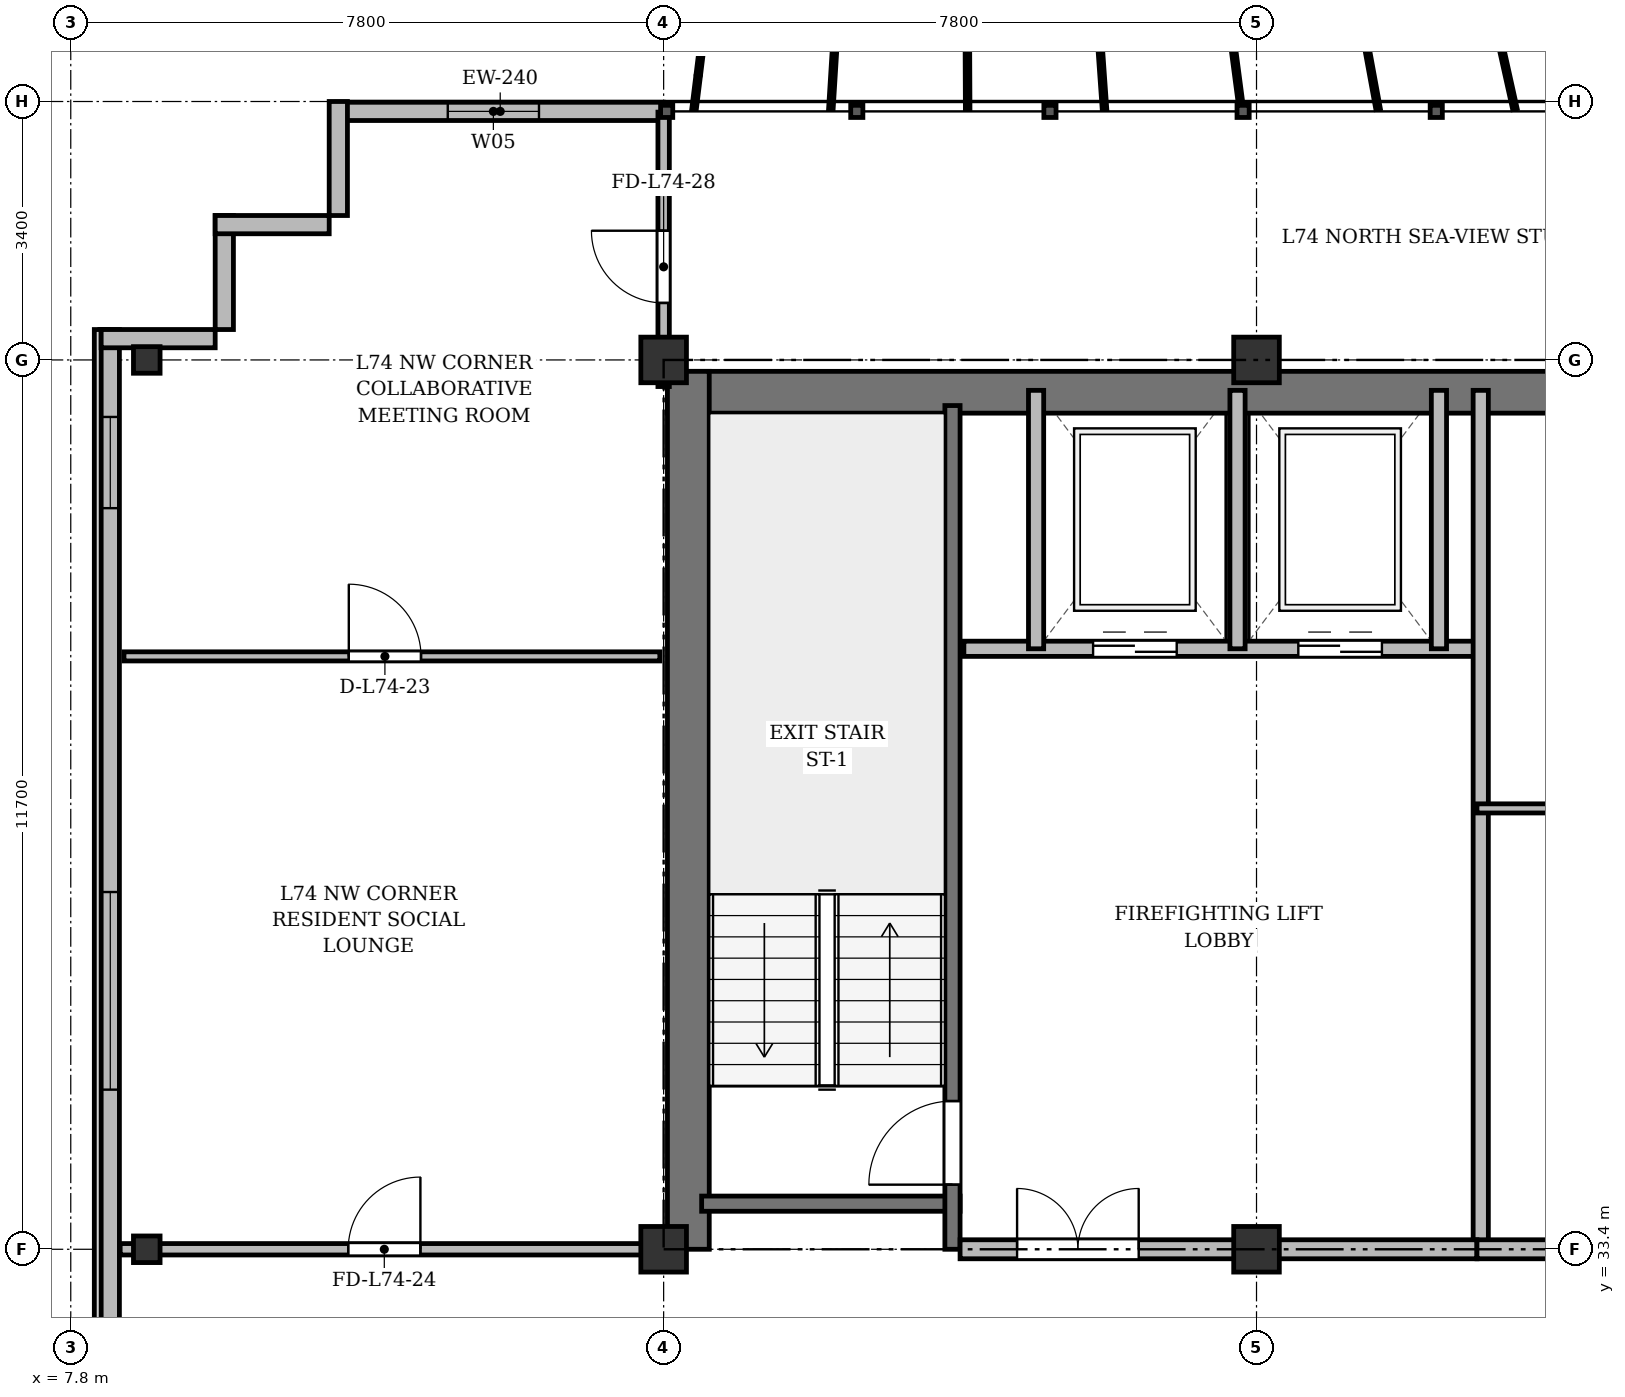
"""IFC4 building model, lengths in metres.
Left out: names, types, materials, properties, quantities, classifications, styles, units other than length and angle.
Written with IfcOpenShell. Run it as: python <this file> out.ifc"""

import sys

from ifc_helpers import new_model, si_unit, direction, frame, frame_2d, origin, origin_2d, place, context, subcontext, project, spatial, rectangle, i_section, extrude, source, transform, mapped, element, fill, save


model = new_model("IFC4")
c1 = context("Model", 3, precision=1e-05, world=origin(), true_north=direction((0.0, 1.0)))
c2 = subcontext(c1, "Body", "Model", "MODEL_VIEW")
j1 = project(units=[si_unit("LENGTHUNIT", "METRE"), si_unit("PLANEANGLEUNIT", "RADIAN")], contexts=[c1])
p1 = place(None, origin())
s1 = spatial("IfcSite", under=j1, at=p1, CompositionType="ELEMENT")
p2 = place(p1, origin())
s2 = spatial("IfcBuilding", under=s1, at=p2, CompositionType="ELEMENT")
p3 = place(p2, frame((0.0, 0.0, 284.7)))
s3 = spatial("IfcBuildingStorey", under=s2, at=p3, CompositionType="ELEMENT", Elevation=284.7)
m1 = source(origin(), c2, "Body", "SweptSolid", [
    extrude(i_section(OverallWidth=0.35, OverallDepth=0.35, WebThickness=0.018, FlangeThickness=0.028, at=origin_2d()), origin(), (0.0, 0.0, 1.0), 3.6),
])
for number, where, z_axis, x_axis in (
    (1, (8.8, 33.4, 0.0), (0.0, 0.0, 1.0), (1.0, 0.0, 0.0)),
    (2, (8.8, 45.1, 0.0), (0.0, 0.0, 1.0), (1.0, 0.0, 0.0)),
):
    element("IfcColumn", number, at=place(p3, frame(where, z_axis=z_axis, x_axis=x_axis)), inside=s3, PredefinedType="COLUMN", context=c2, shape_type="MappedRepresentation", body=[
        mapped(m1, transform((0.0, 0.0, 0.0), x_axis=(1.0, 0.0, 0.0), y_axis=(0.0, 1.0, 0.0), z_axis=(0.0, 0.0, 1.0), scale=1.0)),
    ])
m2 = source(origin(), c2, "Body", "SweptSolid", [
    extrude(rectangle(XDim=0.6, YDim=0.6, at=origin_2d()), origin(), (0.0, 0.0, 1.0), 3.6),
])
for number, where, z_axis, x_axis in (
    (3, (15.6, 33.4, 0.0), (0.0, 0.0, 1.0), (1.0, 0.0, 0.0)),
    (4, (15.6, 45.1, 0.0), (0.0, 0.0, 1.0), (1.0, 0.0, 0.0)),
    (5, (23.4, 33.4, 0.0), (0.0, 0.0, 1.0), (1.0, 0.0, 0.0)),
    (6, (23.4, 45.1, 0.0), (0.0, 0.0, 1.0), (1.0, 0.0, 0.0)),
):
    element("IfcColumn", number, at=place(p3, frame(where, z_axis=z_axis, x_axis=x_axis)), inside=s3, PredefinedType="COLUMN", context=c2, shape_type="MappedRepresentation", body=[
        mapped(m2, transform((0.0, 0.0, 0.0), x_axis=(1.0, 0.0, 0.0), y_axis=(0.0, 1.0, 0.0), z_axis=(0.0, 0.0, 1.0), scale=1.0)),
    ])
p4 = place(p3, frame((11.3, 48.37, 0.0), z_axis=(0.0, 0.0, 1.0), x_axis=(1.0, 0.0, 0.0)))
e7 = element("IfcWall", 7, at=p4, inside=s3, PredefinedType="SOLIDWALL", context=c2, shape_type="SweptSolid", body=[
    extrude(rectangle(XDim=4.3, YDim=0.24, at=frame_2d((2.15, 0.0))), origin(), (0.0, 0.0, 1.0), 3.37),
])
p5 = place(p4, frame((1.46, 0.0, 0.9)))
e8 = element("IfcOpeningElement", 8, at=p5, cuts=e7, PredefinedType="OPENING", context=c2, shape_type="SweptSolid", body=[
    extrude(rectangle(XDim=1.2, YDim=1.65, at=frame_2d((0.6, 0.825))), frame((0.0, 0.13, 0.0), z_axis=(0.0, -1.0, 0.0), x_axis=(1.0, 0.0, 0.0)), (0.0, 0.0, 1.0), 0.26),
])
p6 = place(p3, frame((8.32, 6.5, 0.0), z_axis=(0.0, 0.0, 1.0), x_axis=(0.0, 1.0, 0.0)))
e9 = element("IfcWall", 9, at=p6, inside=s3, PredefinedType="SOLIDWALL", context=c2, shape_type="SweptSolid", body=[
    extrude(rectangle(XDim=39.0, YDim=0.24, at=frame_2d((19.5, 0.0))), origin(), (0.0, 0.0, 1.0), 3.37),
])
p7 = place(p6, frame((1.45, 0.0, 0.92)))
e10 = element("IfcOpeningElement", 10, at=p7, cuts=e9, PredefinedType="OPENING", context=c2, shape_type="SweptSolid", body=[
    extrude(rectangle(XDim=1.2, YDim=1.65, at=frame_2d((0.6, 0.825))), frame((0.0, 0.13, 0.0), z_axis=(0.0, -1.0, 0.0), x_axis=(1.0, 0.0, 0.0)), (0.0, 0.0, 1.0), 0.26),
])
p8 = place(p6, frame((3.6, 0.0, 0.92)))
e11 = element("IfcOpeningElement", 11, at=p8, cuts=e9, PredefinedType="OPENING", context=c2, shape_type="SweptSolid", body=[
    extrude(rectangle(XDim=2.6, YDim=1.9, at=frame_2d((1.3, 0.95))), frame((0.0, 0.13, 0.0), z_axis=(0.0, -1.0, 0.0), x_axis=(1.0, 0.0, 0.0)), (0.0, 0.0, 1.0), 0.26),
])
p9 = place(p6, frame((15.0, 0.0, 0.92)))
e12 = element("IfcOpeningElement", 12, at=p9, cuts=e9, PredefinedType="OPENING", context=c2, shape_type="SweptSolid", body=[
    extrude(rectangle(XDim=2.6, YDim=1.9, at=frame_2d((1.3, 0.95))), frame((0.0, 0.13, 0.0), z_axis=(0.0, -1.0, 0.0), x_axis=(1.0, 0.0, 0.0)), (0.0, 0.0, 1.0), 0.26),
])
p10 = place(p6, frame((29.0, 0.0, 0.92)))
e13 = element("IfcOpeningElement", 13, at=p10, cuts=e9, PredefinedType="OPENING", context=c2, shape_type="SweptSolid", body=[
    extrude(rectangle(XDim=2.6, YDim=1.9, at=frame_2d((1.3, 0.95))), frame((0.0, 0.13, 0.0), z_axis=(0.0, -1.0, 0.0), x_axis=(1.0, 0.0, 0.0)), (0.0, 0.0, 1.0), 0.26),
])
p11 = place(p6, frame((36.65, 0.0, 0.92)))
e14 = element("IfcOpeningElement", 14, at=p11, cuts=e9, PredefinedType="OPENING", context=c2, shape_type="SweptSolid", body=[
    extrude(rectangle(XDim=1.2, YDim=1.65, at=frame_2d((0.6, 0.825))), frame((0.0, 0.13, 0.0), z_axis=(0.0, -1.0, 0.0), x_axis=(1.0, 0.0, 0.0)), (0.0, 0.0, 1.0), 0.26),
])
for number, where, z_axis, x_axis in (
    (15, (8.2, 45.38, 0.0), (0.0, 0.0, 1.0), (1.0, 0.0, 0.0)),
    (16, (9.82, 45.5, 0.0), (0.0, 0.0, 1.0), (0.0, 1.0, 0.0)),
    (17, (9.7, 46.88, 0.0), (0.0, 0.0, 1.0), (1.0, 0.0, 0.0)),
    (18, (11.32, 47.0, 0.0), (0.0, 0.0, 1.0), (0.0, 1.0, 0.0)),
):
    element("IfcWall", number, at=place(p3, frame(where, z_axis=z_axis, x_axis=x_axis)), inside=s3, PredefinedType="SOLIDWALL", context=c2, shape_type="SweptSolid", body=[
        extrude(rectangle(XDim=1.5, YDim=0.24, at=frame_2d((0.75, 0.0))), origin(), (0.0, 0.0, 1.0), 3.37),
    ])
p12 = place(p3, frame((15.65, 44.675, 0.0), z_axis=(0.0, 0.0, 1.0), x_axis=(1.0, 0.0, 0.0)))
e19 = element("IfcWall", 19, at=p12, inside=s3, PredefinedType="SHEAR", context=c2, shape_type="SweptSolid", body=[
    extrude(rectangle(XDim=43.1, YDim=0.55, at=frame_2d((21.55, 0.0))), origin(), (0.0, 0.0, 1.0), 3.37),
])
p13 = place(p3, frame((15.925, 33.4, 0.0), z_axis=(0.0, 0.0, 1.0), x_axis=(0.0, 1.0, 0.0)))
e20 = element("IfcWall", 20, at=p13, inside=s3, PredefinedType="SHEAR", context=c2, shape_type="SweptSolid", body=[
    extrude(rectangle(XDim=11.55, YDim=0.55, at=frame_2d((5.775, 0.0))), origin(), (0.0, 0.0, 1.0), 3.37),
])
p14 = place(p3, frame((16.1, 34.0, 0.0), z_axis=(0.0, 0.0, 1.0), x_axis=(1.0, 0.0, 0.0)))
e21 = element("IfcWall", 21, at=p14, inside=s3, PredefinedType="SHEAR", context=c2, shape_type="SweptSolid", body=[
    extrude(rectangle(XDim=3.4, YDim=0.2, at=frame_2d((1.7, 0.0))), origin(), (0.0, 0.0, 1.0), 3.37),
])
p15 = place(p3, frame((19.4, 33.4, 0.0), z_axis=(0.0, 0.0, 1.0), x_axis=(0.0, 1.0, 0.0)))
e22 = element("IfcWall", 22, at=p15, inside=s3, PredefinedType="SHEAR", context=c2, shape_type="SweptSolid", body=[
    extrude(rectangle(XDim=11.1, YDim=0.2, at=frame_2d((5.55, 0.0))), origin(), (0.0, 0.0, 1.0), 3.37),
])
p16 = place(p15, frame((0.85, 0.0, 0.0)))
e23 = element("IfcOpeningElement", 23, at=p16, cuts=e22, PredefinedType="OPENING", context=c2, shape_type="SweptSolid", body=[
    extrude(rectangle(XDim=1.1, YDim=2.15, at=frame_2d((0.55, 1.075))), frame((0.0, 0.11, 0.0), z_axis=(0.0, -1.0, 0.0), x_axis=(1.0, 0.0, 0.0)), (0.0, 0.0, 1.0), 0.22),
])
p17 = place(p3, frame((19.55, 41.3, 0.0), z_axis=(0.0, 0.0, 1.0), x_axis=(1.0, 0.0, 0.0)))
e24 = element("IfcWall", 24, at=p17, inside=s3, PredefinedType="SOLIDWALL", context=c2, shape_type="SweptSolid", body=[
    extrude(rectangle(XDim=6.75, YDim=0.2, at=frame_2d((3.375, 0.0))), origin(), (0.0, 0.0, 1.0), 3.37),
])
p18 = place(p17, frame((1.7, 0.0, 0.0)))
e25 = element("IfcOpeningElement", 25, at=p18, cuts=e24, PredefinedType="OPENING", context=c2, shape_type="SweptSolid", body=[
    extrude(rectangle(XDim=1.1, YDim=2.15, at=frame_2d((0.55, 1.075))), frame((0.0, 0.11, 0.0), z_axis=(0.0, -1.0, 0.0), x_axis=(1.0, 0.0, 0.0)), (0.0, 0.0, 1.0), 0.22),
])
p19 = place(p17, frame((4.4, 0.0, 0.0)))
e26 = element("IfcOpeningElement", 26, at=p19, cuts=e24, PredefinedType="OPENING", context=c2, shape_type="SweptSolid", body=[
    extrude(rectangle(XDim=1.1, YDim=2.15, at=frame_2d((0.55, 1.075))), frame((0.0, 0.11, 0.0), z_axis=(0.0, -1.0, 0.0), x_axis=(1.0, 0.0, 0.0)), (0.0, 0.0, 1.0), 0.22),
])
for number, where, z_axis, x_axis in (
    (27, (20.5, 41.3, 0.0), (0.0, 0.0, 1.0), (0.0, 1.0, 0.0)),
    (28, (23.15, 41.3, 0.0), (0.0, 0.0, 1.0), (0.0, 1.0, 0.0)),
    (29, (25.8, 41.3, 0.0), (0.0, 0.0, 1.0), (0.0, 1.0, 0.0)),
):
    element("IfcWall", number, at=place(p3, frame(where, z_axis=z_axis, x_axis=x_axis)), inside=s3, PredefinedType="SOLIDWALL", context=c2, shape_type="SweptSolid", body=[
        extrude(rectangle(XDim=3.4, YDim=0.2, at=frame_2d((1.7, 0.0))), origin(), (0.0, 0.0, 1.0), 3.37),
    ])
p20 = place(p3, frame((26.35, 33.4, 0.0), z_axis=(0.0, 0.0, 1.0), x_axis=(0.0, 1.0, 0.0)))
e30 = element("IfcWall", 30, at=p20, inside=s3, PredefinedType="SOLIDWALL", context=c2, shape_type="SweptSolid", body=[
    extrude(rectangle(XDim=11.3, YDim=0.2, at=frame_2d((5.65, 0.0))), origin(), (0.0, 0.0, 1.0), 2.92),
])
p21 = place(p3, frame((19.5, 33.4, 0.0), z_axis=(0.0, 0.0, 1.0), x_axis=(1.0, 0.0, 0.0)))
e31 = element("IfcWall", 31, at=p21, inside=s3, PredefinedType="PARTITIONING", context=c2, shape_type="SweptSolid", body=[
    extrude(rectangle(XDim=6.8, YDim=0.25, at=frame_2d((3.4, 0.0))), origin(), (0.0, 0.0, 1.0), 2.92),
])
p22 = place(p21, frame((0.75, 0.0, 0.0)))
e32 = element("IfcOpeningElement", 32, at=p22, cuts=e31, PredefinedType="OPENING", context=c2, shape_type="SweptSolid", body=[
    extrude(rectangle(XDim=1.6, YDim=2.2, at=frame_2d((0.8, 1.1))), frame((0.0, 0.135, 0.0), z_axis=(0.0, -1.0, 0.0), x_axis=(1.0, 0.0, 0.0)), (0.0, 0.0, 1.0), 0.27),
])
p23 = place(p3, frame((26.3, 39.2, 0.0), z_axis=(0.0, 0.0, 1.0), x_axis=(1.0, 0.0, 0.0)))
e33 = element("IfcWall", 33, at=p23, inside=s3, PredefinedType="PARTITIONING", context=c2, shape_type="SweptSolid", body=[
    extrude(rectangle(XDim=7.0, YDim=0.12, at=frame_2d((3.5, 0.0))), origin(), (0.0, 0.0, 1.0), 2.87),
])
p24 = place(p23, frame((2.6, 0.0, 0.0)))
e34 = element("IfcOpeningElement", 34, at=p24, cuts=e33, PredefinedType="OPENING", context=c2, shape_type="SweptSolid", body=[
    extrude(rectangle(XDim=0.95, YDim=2.15, at=frame_2d((0.475, 1.075))), frame((0.0, 0.07, 0.0), z_axis=(0.0, -1.0, 0.0), x_axis=(1.0, 0.0, 0.0)), (0.0, 0.0, 1.0), 0.14),
])
p25 = place(p3, frame((26.3, 33.4, 0.0), z_axis=(0.0, 0.0, 1.0), x_axis=(1.0, 0.0, 0.0)))
e35 = element("IfcWall", 35, at=p25, inside=s3, PredefinedType="PARTITIONING", context=c2, shape_type="SweptSolid", body=[
    extrude(rectangle(XDim=7.0, YDim=0.25, at=frame_2d((3.5, 0.0))), origin(), (0.0, 0.0, 1.0), 2.92),
])
p26 = place(p25, frame((1.35, 0.0, 0.0)))
e36 = element("IfcOpeningElement", 36, at=p26, cuts=e35, PredefinedType="OPENING", context=c2, shape_type="SweptSolid", body=[
    extrude(rectangle(XDim=0.95, YDim=2.15, at=frame_2d((0.475, 1.075))), frame((0.0, 0.135, 0.0), z_axis=(0.0, -1.0, 0.0), x_axis=(1.0, 0.0, 0.0)), (0.0, 0.0, 1.0), 0.27),
])
p27 = place(p3, frame((8.5, 41.2, 0.0), z_axis=(0.0, 0.0, 1.0), x_axis=(1.0, 0.0, 0.0)))
e37 = element("IfcWall", 37, at=p27, inside=s3, PredefinedType="PARTITIONING", context=c2, shape_type="SweptSolid", body=[
    extrude(rectangle(XDim=7.05, YDim=0.12, at=frame_2d((3.525, 0.0))), origin(), (0.0, 0.0, 1.0), 2.87),
])
p28 = place(p27, frame((2.958, 0.0, 0.0)))
e38 = element("IfcOpeningElement", 38, at=p28, cuts=e37, PredefinedType="OPENING", context=c2, shape_type="SweptSolid", body=[
    extrude(rectangle(XDim=0.95, YDim=2.15, at=frame_2d((0.475, 1.075))), frame((0.0, 0.07, 0.0), z_axis=(0.0, -1.0, 0.0), x_axis=(1.0, 0.0, 0.0)), (0.0, 0.0, 1.0), 0.14),
])
p29 = place(p3, frame((8.45, 33.4, 0.0), z_axis=(0.0, 0.0, 1.0), x_axis=(1.0, 0.0, 0.0)))
e39 = element("IfcWall", 39, at=p29, inside=s3, PredefinedType="PARTITIONING", context=c2, shape_type="SweptSolid", body=[
    extrude(rectangle(XDim=7.15, YDim=0.15, at=frame_2d((3.575, 0.0))), origin(), (0.0, 0.0, 1.0), 2.92),
])
p30 = place(p29, frame((3.0, 0.0, 0.0)))
e40 = element("IfcOpeningElement", 40, at=p30, cuts=e39, PredefinedType="OPENING", context=c2, shape_type="SweptSolid", body=[
    extrude(rectangle(XDim=0.95, YDim=2.15, at=frame_2d((0.475, 1.075))), frame((0.0, 0.085, 0.0), z_axis=(0.0, -1.0, 0.0), x_axis=(1.0, 0.0, 0.0)), (0.0, 0.0, 1.0), 0.17),
])
p31 = place(p3, frame((15.6, 44.75, 0.0), z_axis=(0.0, 0.0, 1.0), x_axis=(0.0, 1.0, 0.0)))
e41 = element("IfcWall", 41, at=p31, inside=s3, PredefinedType="PARTITIONING", context=c2, shape_type="SweptSolid", body=[
    extrude(rectangle(XDim=3.61, YDim=0.15, at=frame_2d((1.805, 0.0))), origin(), (0.0, 0.0, 1.0), 2.87),
])
p32 = place(p31, frame((1.1, 0.0, 0.0)))
e42 = element("IfcOpeningElement", 42, at=p32, cuts=e41, PredefinedType="OPENING", context=c2, shape_type="SweptSolid", body=[
    extrude(rectangle(XDim=0.95, YDim=2.15, at=frame_2d((0.475, 1.075))), frame((0.0, 0.085, 0.0), z_axis=(0.0, -1.0, 0.0), x_axis=(1.0, 0.0, 0.0)), (0.0, 0.0, 1.0), 0.17),
])
m3 = source(origin(), c2, "Body", "SweptSolid", [
    extrude(rectangle(XDim=1.2, YDim=1.65, at=frame_2d((0.6, 0.825))), frame((0.0, 0.03, 0.0), z_axis=(0.0, -1.0, 0.0), x_axis=(1.0, 0.0, 0.0)), (0.0, 0.0, 1.0), 0.06),
])
p33 = place(p5, origin())
e43 = element("IfcWindow", 43, at=p33, inside=s3, PartitioningType="SINGLE_PANEL", PredefinedType="WINDOW", context=c2, shape_type="MappedRepresentation", body=[
    mapped(m3, transform((0.0, 0.0, 0.0), x_axis=(1.0, 0.0, 0.0), y_axis=(0.0, 1.0, 0.0), z_axis=(0.0, 0.0, 1.0), scale=1.0)),
])
fill(e8, e43)
m4 = source(origin(), c2, "Body", "SweptSolid", [
    extrude(rectangle(XDim=2.6, YDim=1.9, at=frame_2d((1.3, 0.95))), frame((0.0, 0.03, 0.0), z_axis=(0.0, -1.0, 0.0), x_axis=(1.0, 0.0, 0.0)), (0.0, 0.0, 1.0), 0.06),
])
p34 = place(p10, origin())
e44 = element("IfcWindow", 44, at=p34, inside=s3, PartitioningType="SINGLE_PANEL", PredefinedType="WINDOW", context=c2, shape_type="MappedRepresentation", body=[
    mapped(m4, transform((0.0, 0.0, 0.0), x_axis=(1.0, 0.0, 0.0), y_axis=(0.0, 1.0, 0.0), z_axis=(0.0, 0.0, 1.0), scale=1.0)),
])
fill(e13, e44)
p35 = place(p11, origin())
e45 = element("IfcWindow", 45, at=p35, inside=s3, PartitioningType="SINGLE_PANEL", PredefinedType="WINDOW", context=c2, shape_type="MappedRepresentation", body=[
    mapped(m3, transform((0.0, 0.0, 0.0), x_axis=(1.0, 0.0, 0.0), y_axis=(0.0, 1.0, 0.0), z_axis=(0.0, 0.0, 1.0), scale=1.0)),
])
fill(e14, e45)
m5 = source(origin(), c2, "Body", "SweptSolid", [
    extrude(rectangle(XDim=1.1, YDim=2.15, at=frame_2d((0.55, 1.075))), frame((0.0, 0.025, 0.0), z_axis=(0.0, -1.0, 0.0), x_axis=(1.0, 0.0, 0.0)), (0.0, 0.0, 1.0), 0.05),
])
p36 = place(p16, origin())
e46 = element("IfcDoor", 46, at=p36, inside=s3, OperationType="SINGLE_SWING_LEFT", PredefinedType="DOOR", context=c2, shape_type="MappedRepresentation", body=[
    mapped(m5, transform((0.0, 0.0, 0.0), x_axis=(1.0, 0.0, 0.0), y_axis=(0.0, 1.0, 0.0), z_axis=(0.0, 0.0, 1.0), scale=1.0)),
])
fill(e23, e46)
p37 = place(p18, origin())
e47 = element("IfcDoor", 47, at=p37, inside=s3, OperationType="DOUBLE_DOOR_SLIDING", PredefinedType="DOOR", context=c2, shape_type="MappedRepresentation", body=[
    mapped(m5, transform((0.0, 0.0, 0.0), x_axis=(1.0, 0.0, 0.0), y_axis=(0.0, 1.0, 0.0), z_axis=(0.0, 0.0, 1.0), scale=1.0)),
])
fill(e25, e47)
p38 = place(p19, origin())
e48 = element("IfcDoor", 48, at=p38, inside=s3, OperationType="DOUBLE_DOOR_SLIDING", PredefinedType="DOOR", context=c2, shape_type="MappedRepresentation", body=[
    mapped(m5, transform((0.0, 0.0, 0.0), x_axis=(1.0, 0.0, 0.0), y_axis=(0.0, 1.0, 0.0), z_axis=(0.0, 0.0, 1.0), scale=1.0)),
])
fill(e26, e48)
m6 = source(origin(), c2, "Body", "SweptSolid", [
    extrude(rectangle(XDim=1.6, YDim=2.2, at=frame_2d((0.8, 1.1))), frame((0.0, 0.025, 0.0), z_axis=(0.0, -1.0, 0.0), x_axis=(1.0, 0.0, 0.0)), (0.0, 0.0, 1.0), 0.05),
])
p39 = place(p22, origin())
e49 = element("IfcDoor", 49, at=p39, inside=s3, OperationType="DOUBLE_DOOR_SINGLE_SWING", PredefinedType="DOOR", context=c2, shape_type="MappedRepresentation", body=[
    mapped(m6, transform((0.0, 0.0, 0.0), x_axis=(1.0, 0.0, 0.0), y_axis=(0.0, 1.0, 0.0), z_axis=(0.0, 0.0, 1.0), scale=1.0)),
])
fill(e32, e49)
m7 = source(origin(), c2, "Body", "SweptSolid", [
    extrude(rectangle(XDim=0.95, YDim=2.15, at=frame_2d((0.475, 1.075))), frame((0.0, 0.025, 0.0), z_axis=(0.0, -1.0, 0.0), x_axis=(1.0, 0.0, 0.0)), (0.0, 0.0, 1.0), 0.05),
])
p40 = place(p28, origin())
e50 = element("IfcDoor", 50, at=p40, inside=s3, OperationType="SINGLE_SWING_LEFT", PredefinedType="DOOR", context=c2, shape_type="MappedRepresentation", body=[
    mapped(m7, transform((0.0, 0.0, 0.0), x_axis=(1.0, 0.0, 0.0), y_axis=(0.0, 1.0, 0.0), z_axis=(0.0, 0.0, 1.0), scale=1.0)),
])
fill(e38, e50)
p41 = place(p30, origin())
e51 = element("IfcDoor", 51, at=p41, inside=s3, OperationType="SINGLE_SWING_RIGHT", PredefinedType="DOOR", context=c2, shape_type="MappedRepresentation", body=[
    mapped(m7, transform((0.0, 0.0, 0.0), x_axis=(1.0, 0.0, 0.0), y_axis=(0.0, 1.0, 0.0), z_axis=(0.0, 0.0, 1.0), scale=1.0)),
])
fill(e40, e51)
p42 = place(p32, origin())
e52 = element("IfcDoor", 52, at=p42, inside=s3, OperationType="SINGLE_SWING_RIGHT", PredefinedType="DOOR", context=c2, shape_type="MappedRepresentation", body=[
    mapped(m7, transform((0.0, 0.0, 0.0), x_axis=(1.0, 0.0, 0.0), y_axis=(0.0, 1.0, 0.0), z_axis=(0.0, 0.0, 1.0), scale=1.0)),
])
fill(e42, e52)
save(model, sys.argv[1])
